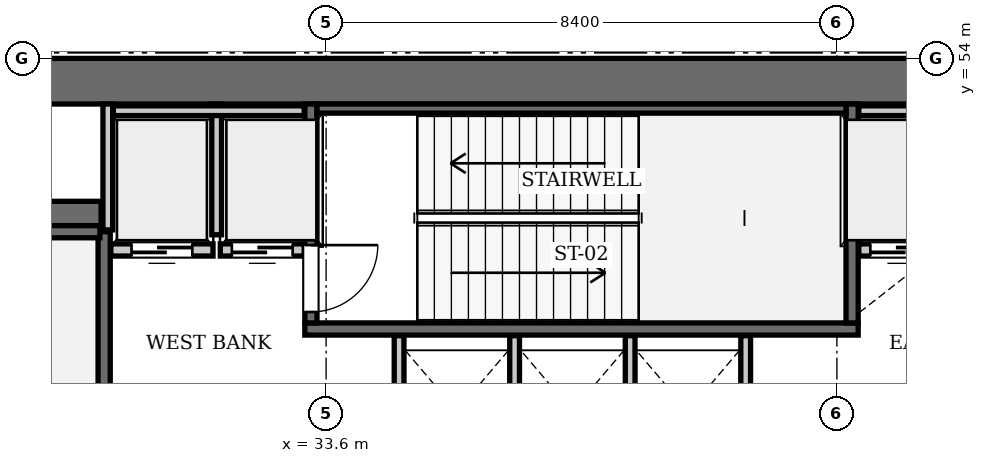
"""IFC4 building model, lengths in metres.
Left out: names, types, materials, properties, quantities, classifications, styles, units other than length and angle.
Written with IfcOpenShell. Run it as: python <this file> out.ifc"""

import sys

from ifc_helpers import new_model, si_unit, direction, frame, frame_2d, origin, place, context, subcontext, project, spatial, rectangle, extrude, element, fill, save


model = new_model("IFC4")
c1 = context("Model", 3, precision=1e-05, world=origin(), true_north=direction((0.0, 1.0)))
c2 = subcontext(c1, "Body", "Model", "MODEL_VIEW")
j1 = project(units=[si_unit("LENGTHUNIT", "METRE"), si_unit("PLANEANGLEUNIT", "RADIAN")], contexts=[c1])
p1 = place(None, origin())
s1 = spatial("IfcSite", under=j1, at=p1, CompositionType="ELEMENT")
p2 = place(p1, origin())
s2 = spatial("IfcBuilding", under=s1, at=p2, CompositionType="ELEMENT")
p3 = place(p2, frame((0.0, 0.0, 122.5)))
s3 = spatial("IfcBuildingStorey", under=s2, at=p3, CompositionType="ELEMENT", Elevation=122.5)
p4 = place(p3, frame((25.2, 53.625, 0.0), z_axis=(0.0, 0.0, 1.0), x_axis=(1.0, 0.0, 0.0)))
e1 = element("IfcWall", 1, at=p4, inside=s3, PredefinedType="SHEAR", context=c2, shape_type="SweptSolid", body=[
    extrude(rectangle(XDim=25.2, YDim=0.75, at=frame_2d((12.6, 0.0))), origin(), (0.0, 0.0, 1.0), 4.9),
])
p5 = place(p3, frame((25.95, 51.4, 0.0), z_axis=(0.0, 0.0, 1.0), x_axis=(1.0, 0.0, 0.0)))
e2 = element("IfcWall", 2, at=p5, inside=s3, PredefinedType="SHEAR", context=c2, shape_type="SweptSolid", body=[
    extrude(rectangle(XDim=3.95, YDim=0.5, at=frame_2d((1.975, 0.0))), origin(), (0.0, 0.0, 1.0), 4.9),
])
p6 = place(p3, frame((29.95, 42.15, 0.0), z_axis=(0.0, 0.0, 1.0), x_axis=(0.0, 1.0, 0.0)))
e3 = element("IfcWall", 3, at=p6, inside=s3, PredefinedType="SOLIDWALL", context=c2, shape_type="SweptSolid", body=[
    extrude(rectangle(XDim=9.0, YDim=0.2, at=frame_2d((4.5, 0.0))), origin(), (0.0, 0.0, 1.0), 4.66),
])
p7 = place(p3, frame((26.38, 51.15, 0.0), z_axis=(0.0, 0.0, 1.0), x_axis=(1.0, 0.0, 0.0)))
e4 = element("IfcWall", 4, at=p7, inside=s3, PredefinedType="SOLIDWALL", context=c2, shape_type="SweptSolid", body=[
    extrude(rectangle(XDim=3.5, YDim=0.2, at=frame_2d((1.75, 0.0))), origin(), (0.0, 0.0, 1.0), 4.66),
])
p8 = place(p3, frame((33.25, 49.55, 0.0), z_axis=(0.0, 0.0, 1.0), x_axis=(1.0, 0.0, 0.0)))
e5 = element("IfcWall", 5, at=p8, inside=s3, PredefinedType="SOLIDWALL", context=c2, shape_type="SweptSolid", body=[
    extrude(rectangle(XDim=9.1, YDim=0.2, at=frame_2d((4.55, 0.0))), origin(), (0.0, 0.0, 1.0), 4.66),
])
p9 = place(p3, frame((42.25, 49.65, 0.0), z_axis=(0.0, 0.0, 1.0), x_axis=(0.0, 1.0, 0.0)))
e6 = element("IfcWall", 6, at=p9, inside=s3, PredefinedType="SOLIDWALL", context=c2, shape_type="SweptSolid", body=[
    extrude(rectangle(XDim=3.6, YDim=0.2, at=frame_2d((1.8, 0.0))), origin(), (0.0, 0.0, 1.0), 4.66),
])
p10 = place(p3, frame((33.35, 49.65, 0.0), z_axis=(0.0, 0.0, 1.0), x_axis=(0.0, 1.0, 0.0)))
e7 = element("IfcWall", 7, at=p10, inside=s3, PredefinedType="SOLIDWALL", context=c2, shape_type="SweptSolid", body=[
    extrude(rectangle(XDim=3.6, YDim=0.2, at=frame_2d((1.8, 0.0))), origin(), (0.0, 0.0, 1.0), 4.66),
])
p11 = place(p10, frame((0.18, 0.0, 0.0)))
e8 = element("IfcOpeningElement", 8, at=p11, cuts=e7, PredefinedType="OPENING", context=c2, shape_type="SweptSolid", body=[
    extrude(rectangle(XDim=1.1, YDim=2.15, at=frame_2d((0.55, 1.075))), frame((0.0, 0.11, 0.0), z_axis=(0.0, -1.0, 0.0), x_axis=(1.0, 0.0, 0.0)), (0.0, 0.0, 1.0), 0.22),
])
p12 = place(p3, frame((33.45, 53.175, 0.0), z_axis=(0.0, 0.0, 1.0), x_axis=(1.0, 0.0, 0.0)))
e9 = element("IfcWall", 9, at=p12, inside=s3, PredefinedType="SOLIDWALL", context=c2, shape_type="SweptSolid", body=[
    extrude(rectangle(XDim=8.7, YDim=0.15, at=frame_2d((4.35, 0.0))), origin(), (0.0, 0.0, 1.0), 4.66),
])
p13 = place(p3, frame((30.06, 50.85, 0.0), z_axis=(0.0, 0.0, 1.0), x_axis=(1.0, 0.0, 0.0)))
e10 = element("IfcWall", 10, at=p13, inside=s3, PredefinedType="SOLIDWALL", context=c2, shape_type="SweptSolid", body=[
    extrude(rectangle(XDim=1.68, YDim=0.2, at=frame_2d((0.84, 0.0))), origin(), (0.0, 0.0, 1.0), 4.66),
])
p14 = place(p13, frame((0.34, 0.0, 0.0)))
e11 = element("IfcOpeningElement", 11, at=p14, cuts=e10, PredefinedType="OPENING", context=c2, shape_type="SweptSolid", body=[
    extrude(rectangle(XDim=1.0, YDim=2.15, at=frame_2d((0.5, 1.075))), frame((0.0, 0.11, 0.0), z_axis=(0.0, -1.0, 0.0), x_axis=(1.0, 0.0, 0.0)), (0.0, 0.0, 1.0), 0.22),
])
p15 = place(p3, frame((31.86, 50.85, 0.0), z_axis=(0.0, 0.0, 1.0), x_axis=(1.0, 0.0, 0.0)))
e12 = element("IfcWall", 12, at=p15, inside=s3, PredefinedType="SOLIDWALL", context=c2, shape_type="SweptSolid", body=[
    extrude(rectangle(XDim=1.38, YDim=0.2, at=frame_2d((0.69, 0.0))), origin(), (0.0, 0.0, 1.0), 4.66),
])
p16 = place(p15, frame((0.19, 0.0, 0.0)))
e13 = element("IfcOpeningElement", 13, at=p16, cuts=e12, PredefinedType="OPENING", context=c2, shape_type="SweptSolid", body=[
    extrude(rectangle(XDim=1.0, YDim=2.15, at=frame_2d((0.5, 1.075))), frame((0.0, 0.11, 0.0), z_axis=(0.0, -1.0, 0.0), x_axis=(1.0, 0.0, 0.0)), (0.0, 0.0, 1.0), 0.22),
])
p17 = place(p3, frame((42.36, 50.85, 0.0), z_axis=(0.0, 0.0, 1.0), x_axis=(1.0, 0.0, 0.0)))
e14 = element("IfcWall", 14, at=p17, inside=s3, PredefinedType="SOLIDWALL", context=c2, shape_type="SweptSolid", body=[
    extrude(rectangle(XDim=1.38, YDim=0.2, at=frame_2d((0.69, 0.0))), origin(), (0.0, 0.0, 1.0), 4.66),
])
p18 = place(p17, frame((0.19, 0.0, 0.0)))
e15 = element("IfcOpeningElement", 15, at=p18, cuts=e14, PredefinedType="OPENING", context=c2, shape_type="SweptSolid", body=[
    extrude(rectangle(XDim=1.0, YDim=2.15, at=frame_2d((0.5, 1.075))), frame((0.0, 0.11, 0.0), z_axis=(0.0, -1.0, 0.0), x_axis=(1.0, 0.0, 0.0)), (0.0, 0.0, 1.0), 0.22),
])
p19 = place(p3, frame((30.01, 51.18, 0.0), z_axis=(0.0, 0.0, 1.0), x_axis=(0.0, 1.0, 0.0)))
e16 = element("IfcWall", 16, at=p19, inside=s3, PredefinedType="SOLIDWALL", context=c2, shape_type="SweptSolid", body=[
    extrude(rectangle(XDim=2.07, YDim=0.16, at=frame_2d((1.035, 0.0))), origin(), (0.0, 0.0, 1.0), 4.66),
])
p20 = place(p3, frame((31.8, 51.1, 0.0), z_axis=(0.0, 0.0, 1.0), x_axis=(0.0, 1.0, 0.0)))
e17 = element("IfcWall", 17, at=p20, inside=s3, PredefinedType="SOLIDWALL", context=c2, shape_type="SweptSolid", body=[
    extrude(rectangle(XDim=2.15, YDim=0.16, at=frame_2d((1.075, 0.0))), origin(), (0.0, 0.0, 1.0), 4.66),
])
for number, where, z_axis, x_axis in (
    (18, (30.1, 53.14, 0.0), (0.0, 0.0, 1.0), (1.0, 0.0, 0.0)),
    (19, (42.36, 53.14, 0.0), (0.0, 0.0, 1.0), (1.0, 0.0, 0.0)),
):
    element("IfcWall", number, at=place(p3, frame(where, z_axis=z_axis, x_axis=x_axis)), inside=s3, PredefinedType="SOLIDWALL", context=c2, shape_type="SweptSolid", body=[
        extrude(rectangle(XDim=3.14, YDim=0.16, at=frame_2d((1.57, 0.0))), origin(), (0.0, 0.0, 1.0), 4.66),
    ])
for number, where, z_axis, x_axis in (
    (20, (34.8, 47.25, 0.0), (0.0, 0.0, 1.0), (0.0, 1.0, 0.0)),
    (21, (36.7, 47.25, 0.0), (0.0, 0.0, 1.0), (0.0, 1.0, 0.0)),
    (22, (38.6, 47.25, 0.0), (0.0, 0.0, 1.0), (0.0, 1.0, 0.0)),
    (23, (40.5, 47.25, 0.0), (0.0, 0.0, 1.0), (0.0, 1.0, 0.0)),
):
    element("IfcWall", number, at=place(p3, frame(where, z_axis=z_axis, x_axis=x_axis)), inside=s3, PredefinedType="SOLIDWALL", context=c2, shape_type="SweptSolid", body=[
        extrude(rectangle(XDim=2.19, YDim=0.16, at=frame_2d((1.095, 0.0))), origin(), (0.0, 0.0, 1.0), 4.66),
    ])
p21 = place(p11, frame((1.1, 0.0, 0.0), z_axis=(0.0, 0.0, 1.0), x_axis=(-1.0, 0.0, 0.0)))
e24 = element("IfcDoor", 24, at=p21, inside=s3, OperationType="SINGLE_SWING_LEFT", PredefinedType="DOOR", context=c2, shape_type="SweptSolid", body=[
    extrude(rectangle(XDim=1.1, YDim=2.15, at=frame_2d((0.55, 1.075))), frame((0.0, 0.025, 0.0), z_axis=(0.0, -1.0, 0.0), x_axis=(1.0, 0.0, 0.0)), (0.0, 0.0, 1.0), 0.05),
])
fill(e8, e24)
p22 = place(p14, frame((1.0, 0.0, 0.0), z_axis=(0.0, 0.0, 1.0), x_axis=(-1.0, 0.0, 0.0)))
e25 = element("IfcDoor", 25, at=p22, inside=s3, OperationType="SLIDING_TO_LEFT", PredefinedType="DOOR", context=c2, shape_type="SweptSolid", body=[
    extrude(rectangle(XDim=1.0, YDim=2.15, at=frame_2d((0.5, 1.075))), frame((0.0, 0.025, 0.0), z_axis=(0.0, -1.0, 0.0), x_axis=(1.0, 0.0, 0.0)), (0.0, 0.0, 1.0), 0.05),
])
fill(e11, e25)
p23 = place(p16, frame((1.0, 0.0, 0.0), z_axis=(0.0, 0.0, 1.0), x_axis=(-1.0, 0.0, 0.0)))
e26 = element("IfcDoor", 26, at=p23, inside=s3, OperationType="SLIDING_TO_LEFT", PredefinedType="DOOR", context=c2, shape_type="SweptSolid", body=[
    extrude(rectangle(XDim=1.0, YDim=2.15, at=frame_2d((0.5, 1.075))), frame((0.0, 0.025, 0.0), z_axis=(0.0, -1.0, 0.0), x_axis=(1.0, 0.0, 0.0)), (0.0, 0.0, 1.0), 0.05),
])
fill(e13, e26)
p24 = place(p18, frame((1.0, 0.0, 0.0), z_axis=(0.0, 0.0, 1.0), x_axis=(-1.0, 0.0, 0.0)))
e27 = element("IfcDoor", 27, at=p24, inside=s3, OperationType="SLIDING_TO_LEFT", PredefinedType="DOOR", context=c2, shape_type="SweptSolid", body=[
    extrude(rectangle(XDim=1.0, YDim=2.15, at=frame_2d((0.5, 1.075))), frame((0.0, 0.025, 0.0), z_axis=(0.0, -1.0, 0.0), x_axis=(1.0, 0.0, 0.0)), (0.0, 0.0, 1.0), 0.05),
])
fill(e15, e27)
save(model, sys.argv[1])
